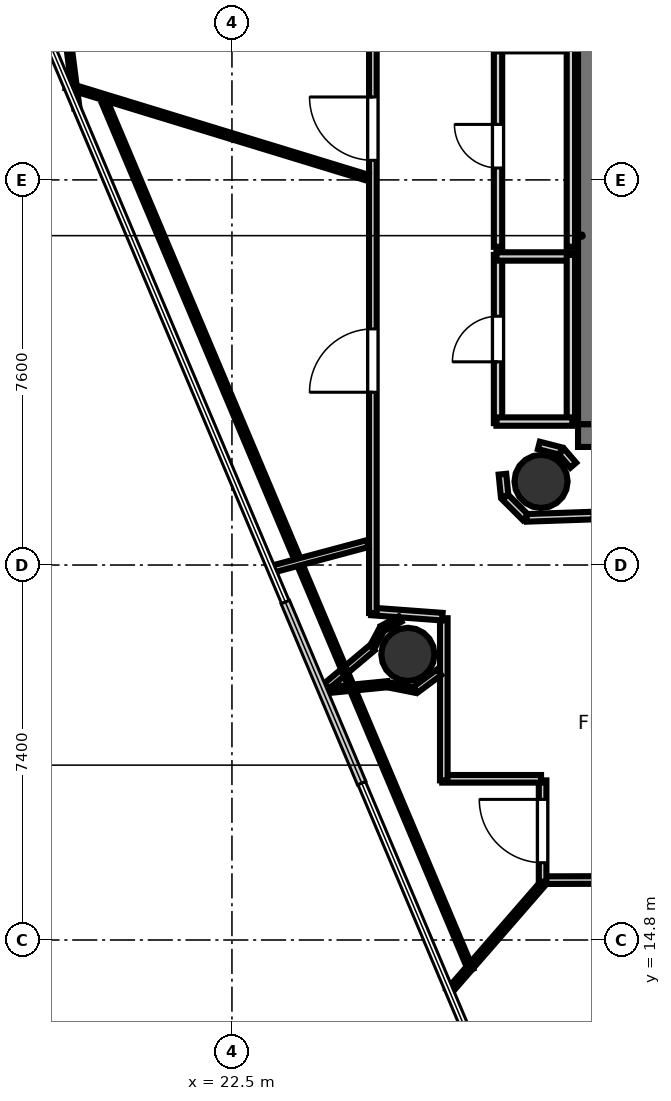
"""IFC4 building model, lengths in metres.
Left out: names, types, materials, properties, quantities, classifications, styles, units other than length and angle.
Written with IfcOpenShell. Run it as: python <this file> out.ifc"""

import sys

from ifc_helpers import new_model, si_unit, direction, frame, frame_2d, origin, origin_2d, place, context, subcontext, project, spatial, rectangle, hollow_circle, extrude, element, fill, save


model = new_model("IFC4")
c1 = context("Model", 3, precision=1e-05, world=origin(), true_north=direction((0.0, 1.0)))
c2 = subcontext(c1, "Body", "Model", "MODEL_VIEW")
j1 = project(units=[si_unit("LENGTHUNIT", "METRE"), si_unit("PLANEANGLEUNIT", "RADIAN")], contexts=[c1])
p1 = place(None, origin())
s1 = spatial("IfcSite", under=j1, at=p1, CompositionType="ELEMENT")
p2 = place(p1, origin())
s2 = spatial("IfcBuilding", under=s1, at=p2, CompositionType="ELEMENT")
p3 = place(p2, frame((0.0, 0.0, 246.4)))
s3 = spatial("IfcBuildingStorey", under=s2, at=p3, CompositionType="ELEMENT", Elevation=246.4)
p4 = place(p3, frame((29.33, 24.755, 0.0), z_axis=(0.0, 0.0, 1.0), x_axis=(1.0, 0.0, 0.0)))
e1 = element("IfcWall", 1, at=p4, inside=s3, PredefinedType="SHEAR", context=c2, shape_type="SweptSolid", body=[
    extrude(rectangle(XDim=10.52, YDim=0.45, at=frame_2d((5.26, 0.0))), origin(), (0.0, 0.0, 1.0), 3.52),
])
p5 = place(p4, frame((0.695, 0.0, 0.0)))
e2 = element("IfcOpeningElement", 2, at=p5, cuts=e1, PredefinedType="OPENING", context=c2, shape_type="SweptSolid", body=[
    extrude(rectangle(XDim=1.25, YDim=2.15, at=frame_2d((0.625, 1.075))), frame((0.0, 0.235, 0.0), z_axis=(0.0, -1.0, 0.0), x_axis=(1.0, 0.0, 0.0)), (0.0, 0.0, 1.0), 0.47),
])
p6 = place(p3, frame((29.555, 24.98, 0.0), z_axis=(0.0, 0.0, 1.0), x_axis=(0.0, 1.0, 0.0)))
e3 = element("IfcWall", 3, at=p6, inside=s3, PredefinedType="SHEAR", context=c2, shape_type="SweptSolid", body=[
    extrude(rectangle(XDim=7.44, YDim=0.45, at=frame_2d((3.72, 0.0))), origin(), (0.0, 0.0, 1.0), 3.52),
])
for number, where, z_axis, x_axis in (
    (4, (28.6, 23.85, 0.0), (0.0, 0.0, 1.0), (1.0, 0.0, 0.0)),
    (5, (25.972, 20.437, 0.0), (0.0, 0.0, 1.0), (1.0, 0.0, 0.0)),
):
    element("IfcColumn", number, at=place(p3, frame(where, z_axis=z_axis, x_axis=x_axis)), inside=s3, PredefinedType="COLUMN", context=c2, shape_type="SweptSolid", body=[
        extrude(hollow_circle(Radius=0.525, WallThickness=0.028, at=origin_2d()), origin(), (0.0, 0.0, 1.0), 3.7),
    ])
p7 = place(p3, frame((27.751, 25.0, 0.0), z_axis=(0.0, 0.0, 1.0), x_axis=(0.0, 1.0, 0.0)))
e6 = element("IfcWall", 6, at=p7, inside=s3, PredefinedType="PLUMBINGWALL", context=c2, shape_type="SweptSolid", body=[
    extrude(rectangle(XDim=3.32, YDim=0.165, at=frame_2d((1.66, 0.0))), origin(), (0.0, 0.0, 1.0), 2.84),
])
p8 = place(p7, frame((1.21, 0.0, 0.0)))
e7 = element("IfcOpeningElement", 7, at=p8, cuts=e6, PredefinedType="OPENING", context=c2, shape_type="SweptSolid", body=[
    extrude(rectangle(XDim=0.9, YDim=2.1, at=frame_2d((0.45, 1.05))), frame((0.0, 0.093, 0.0), z_axis=(0.0, -1.0, 0.0), x_axis=(1.0, 0.0, 0.0)), (0.0, 0.0, 1.0), 0.185),
])
p9 = place(p3, frame((27.72, 28.289, 0.0), z_axis=(0.0, 0.0, 1.0), x_axis=(1.0, 0.0, 0.0)))
e8 = element("IfcWall", 8, at=p9, inside=s3, PredefinedType="PLUMBINGWALL", context=c2, shape_type="SweptSolid", body=[
    extrude(rectangle(XDim=1.5, YDim=0.165, at=frame_2d((0.75, 0.0))), origin(), (0.0, 0.0, 1.0), 2.84),
])
p10 = place(p3, frame((29.189, 28.32, 0.0), z_axis=(0.0, 0.0, 1.0), x_axis=(0.0, -1.0, 0.0)))
e9 = element("IfcWall", 9, at=p10, inside=s3, PredefinedType="PLUMBINGWALL", context=c2, shape_type="SweptSolid", body=[
    extrude(rectangle(XDim=3.32, YDim=0.165, at=frame_2d((1.66, 0.0))), origin(), (0.0, 0.0, 1.0), 2.84),
])
p11 = place(p3, frame((29.22, 25.031, 0.0), z_axis=(0.0, 0.0, 1.0), x_axis=(-1.0, 0.0, 0.0)))
e10 = element("IfcWall", 10, at=p11, inside=s3, PredefinedType="PLUMBINGWALL", context=c2, shape_type="SweptSolid", body=[
    extrude(rectangle(XDim=1.5, YDim=0.165, at=frame_2d((0.75, 0.0))), origin(), (0.0, 0.0, 1.0), 2.84),
])
p12 = place(p3, frame((27.751, 28.48, 0.0), z_axis=(0.0, 0.0, 1.0), x_axis=(0.0, 1.0, 0.0)))
e11 = element("IfcWall", 11, at=p12, inside=s3, PredefinedType="PLUMBINGWALL", context=c2, shape_type="SweptSolid", body=[
    extrude(rectangle(XDim=3.97, YDim=0.165, at=frame_2d((1.985, 0.0))), origin(), (0.0, 0.0, 1.0), 2.84),
])
p13 = place(p12, frame((1.555, 0.0, 0.0)))
e12 = element("IfcOpeningElement", 12, at=p13, cuts=e11, PredefinedType="OPENING", context=c2, shape_type="SweptSolid", body=[
    extrude(rectangle(XDim=0.86, YDim=2.05, at=frame_2d((0.43, 1.025))), frame((0.0, 0.093, 0.0), z_axis=(0.0, -1.0, 0.0), x_axis=(1.0, 0.0, 0.0)), (0.0, 0.0, 1.0), 0.185),
])
p14 = place(p3, frame((29.189, 32.45, 0.0), z_axis=(0.0, 0.0, 1.0), x_axis=(0.0, -1.0, 0.0)))
e13 = element("IfcWall", 13, at=p14, inside=s3, PredefinedType="PLUMBINGWALL", context=c2, shape_type="SweptSolid", body=[
    extrude(rectangle(XDim=3.97, YDim=0.165, at=frame_2d((1.985, 0.0))), origin(), (0.0, 0.0, 1.0), 2.84),
])
p15 = place(p3, frame((29.236, 24.17, 0.0), z_axis=(0.0, 0.0, 1.0), x_axis=(-0.652260263346, 0.757995084984, 0.0)))
e14 = element("IfcWall", 14, at=p15, inside=s3, PredefinedType="PARTITIONING", context=c2, shape_type="SweptSolid", body=[
    extrude(rectangle(XDim=0.355, YDim=0.15, at=frame_2d((0.178, 0.0))), origin(), (0.0, 0.0, 1.0), 2.84),
])
p16 = place(p3, frame((28.988, 24.45, 0.0), z_axis=(0.0, 0.0, 1.0), x_axis=(-0.968704505916, 0.248216800836, 0.0)))
e15 = element("IfcWall", 15, at=p16, inside=s3, PredefinedType="PARTITIONING", context=c2, shape_type="SweptSolid", body=[
    extrude(rectangle(XDim=0.445, YDim=0.15, at=frame_2d((0.222, 0.0))), origin(), (0.0, 0.0, 1.0), 2.84),
])
p17 = place(p3, frame((27.838, 23.992, 0.0), z_axis=(0.0, 0.0, 1.0), x_axis=(0.098273407977, -0.995159453196, 0.0)))
e16 = element("IfcWall", 16, at=p17, inside=s3, PredefinedType="PARTITIONING", context=c2, shape_type="SweptSolid", body=[
    extrude(rectangle(XDim=0.432, YDim=0.15, at=frame_2d((0.216, 0.0))), origin(), (0.0, 0.0, 1.0), 2.84),
])
p18 = place(p3, frame((27.89, 23.543, 0.0), z_axis=(0.0, 0.0, 1.0), x_axis=(0.707106781187, -0.707106781187, 0.0)))
e17 = element("IfcWall", 17, at=p18, inside=s3, PredefinedType="PARTITIONING", context=c2, shape_type="SweptSolid", body=[
    extrude(rectangle(XDim=0.57, YDim=0.15, at=frame_2d((0.285, 0.0))), origin(), (0.0, 0.0, 1.0), 2.84),
])
p19 = place(p3, frame((28.316, 23.131, 0.0), z_axis=(0.0, 0.0, 1.0), x_axis=(0.999405342193, 0.034481328227, 0.0)))
e18 = element("IfcWall", 18, at=p19, inside=s3, PredefinedType="PARTITIONING", context=c2, shape_type="SweptSolid", body=[
    extrude(rectangle(XDim=1.324, YDim=0.15, at=frame_2d((0.662, 0.0))), origin(), (0.0, 0.0, 1.0), 2.84),
])
p20 = place(p3, frame((43.709, 16.02, 0.0), z_axis=(0.0, 0.0, 1.0), x_axis=(-0.999996657873, -0.002585390319, 0.0)))
e19 = element("IfcWall", 19, at=p20, inside=s3, PredefinedType="PARTITIONING", context=c2, shape_type="SweptSolid", body=[
    extrude(rectangle(XDim=15.109, YDim=0.15, at=frame_2d((7.554, 0.0))), origin(), (0.0, 0.0, 1.0), 2.84),
])
p21 = place(p20, frame((10.129, 0.0, 0.0)))
e20 = element("IfcOpeningElement", 20, at=p21, cuts=e19, PredefinedType="OPENING", context=c2, shape_type="SweptSolid", body=[
    extrude(rectangle(XDim=1.25, YDim=2.2, at=frame_2d((0.625, 1.1))), frame((0.0, 0.085, 0.0), z_axis=(0.0, -1.0, 0.0), x_axis=(1.0, 0.0, 0.0)), (0.0, 0.0, 1.0), 0.17),
])
p22 = place(p20, frame((3.337, 0.0, 0.0)))
e21 = element("IfcOpeningElement", 21, at=p22, cuts=e19, PredefinedType="OPENING", context=c2, shape_type="SweptSolid", body=[
    extrude(rectangle(XDim=1.25, YDim=2.2, at=frame_2d((0.625, 1.1))), frame((0.0, 0.085, 0.0), z_axis=(0.0, -1.0, 0.0), x_axis=(1.0, 0.0, 0.0)), (0.0, 0.0, 1.0), 0.17),
])
p23 = place(p3, frame((28.631, 15.95, 0.0), z_axis=(0.0, 0.0, 1.0), x_axis=(0.0, 1.0, 0.0)))
e22 = element("IfcWall", 22, at=p23, inside=s3, PredefinedType="PARTITIONING", context=c2, shape_type="SweptSolid", body=[
    extrude(rectangle(XDim=2.0, YDim=0.15, at=frame_2d((1.0, 0.0))), origin(), (0.0, 0.0, 1.0), 2.84),
])
p24 = place(p23, frame((0.375, 0.0, 0.0)))
e23 = element("IfcOpeningElement", 23, at=p24, cuts=e22, PredefinedType="OPENING", context=c2, shape_type="SweptSolid", body=[
    extrude(rectangle(XDim=1.25, YDim=2.2, at=frame_2d((0.625, 1.1))), frame((0.0, 0.085, 0.0), z_axis=(0.0, -1.0, 0.0), x_axis=(1.0, 0.0, 0.0)), (0.0, 0.0, 1.0), 0.17),
])
p25 = place(p3, frame((28.6, 17.981, 0.0), z_axis=(0.0, 0.0, 1.0), x_axis=(-1.0, 0.0, 0.0)))
e24 = element("IfcWall", 24, at=p25, inside=s3, PredefinedType="PARTITIONING", context=c2, shape_type="SweptSolid", body=[
    extrude(rectangle(XDim=1.95, YDim=0.15, at=frame_2d((0.975, 0.0))), origin(), (0.0, 0.0, 1.0), 2.84),
])
p26 = place(p3, frame((26.681, 17.95, 0.0), z_axis=(0.0, 0.0, 1.0), x_axis=(0.0, 1.0, 0.0)))
e25 = element("IfcWall", 25, at=p26, inside=s3, PredefinedType="PARTITIONING", context=c2, shape_type="SweptSolid", body=[
    extrude(rectangle(XDim=3.2, YDim=0.15, at=frame_2d((1.6, 0.0))), origin(), (0.0, 0.0, 1.0), 2.84),
])
p27 = place(p3, frame((26.652, 21.181, 0.0), z_axis=(0.0, 0.0, 1.0), x_axis=(-0.997303696291, 0.073384857861, 0.0)))
e26 = element("IfcWall", 26, at=p27, inside=s3, PredefinedType="PARTITIONING", context=c2, shape_type="SweptSolid", body=[
    extrude(rectangle(XDim=1.404, YDim=0.15, at=frame_2d((0.702, 0.0))), origin(), (0.0, 0.0, 1.0), 2.84),
])
p28 = place(p3, frame((25.281, 21.253, 0.0), z_axis=(0.0, 0.0, 1.0), x_axis=(0.0, 1.0, 0.0)))
e27 = element("IfcWall", 27, at=p28, inside=s3, PredefinedType="PARTITIONING", context=c2, shape_type="SweptSolid", body=[
    extrude(rectangle(XDim=11.297, YDim=0.15, at=frame_2d((5.648, 0.0))), origin(), (0.0, 0.0, 1.0), 2.84),
])
p29 = place(p28, frame((8.933, 0.0, 0.0)))
e28 = element("IfcOpeningElement", 28, at=p29, cuts=e27, PredefinedType="OPENING", context=c2, shape_type="SweptSolid", body=[
    extrude(rectangle(XDim=1.25, YDim=2.2, at=frame_2d((0.625, 1.1))), frame((0.0, 0.085, 0.0), z_axis=(0.0, -1.0, 0.0), x_axis=(1.0, 0.0, 0.0)), (0.0, 0.0, 1.0), 0.17),
])
p30 = place(p28, frame((4.356, 0.0, 0.0)))
e29 = element("IfcOpeningElement", 29, at=p30, cuts=e27, PredefinedType="OPENING", context=c2, shape_type="SweptSolid", body=[
    extrude(rectangle(XDim=1.25, YDim=2.2, at=frame_2d((0.625, 1.1))), frame((0.0, 0.085, 0.0), z_axis=(0.0, -1.0, 0.0), x_axis=(1.0, 0.0, 0.0)), (0.0, 0.0, 1.0), 0.17),
])
p31 = place(p3, frame((25.819, 21.135, 0.0), z_axis=(0.0, 0.0, 1.0), x_axis=(-0.880749970322, -0.473581555571, 0.0)))
e30 = element("IfcWall", 30, at=p31, inside=s3, PredefinedType="PARTITIONING", context=c2, shape_type="SweptSolid", body=[
    extrude(rectangle(XDim=0.393, YDim=0.12, at=frame_2d((0.197, 0.0))), origin(), (0.0, 0.0, 1.0), 2.84),
])
p32 = place(p3, frame((25.46, 20.936, 0.0), z_axis=(0.0, 0.0, 1.0), x_axis=(-0.471352579484, -0.881944865518, 0.0)))
e31 = element("IfcWall", 31, at=p32, inside=s3, PredefinedType="PARTITIONING", context=c2, shape_type="SweptSolid", body=[
    extrude(rectangle(XDim=0.398, YDim=0.105, at=frame_2d((0.199, 0.0))), origin(), (0.0, 0.0, 1.0), 2.84),
])
p33 = place(p3, frame((25.269, 20.568, 0.0), z_axis=(0.0, 0.0, 1.0), x_axis=(-0.765667528087, -0.643236532259, 0.0)))
e32 = element("IfcWall", 32, at=p33, inside=s3, PredefinedType="PARTITIONING", context=c2, shape_type="SweptSolid", body=[
    extrude(rectangle(XDim=1.288, YDim=0.14, at=frame_2d((0.644, 0.0))), origin(), (0.0, 0.0, 1.0), 2.84),
])
p34 = place(p3, frame((24.29, 19.722, 0.0), z_axis=(0.0, 0.0, 1.0), x_axis=(0.995210765311, 0.097752404619, 0.0)))
e33 = element("IfcWall", 33, at=p34, inside=s3, PredefinedType="PARTITIONING", context=c2, shape_type="SweptSolid", body=[
    extrude(rectangle(XDim=1.284, YDim=0.12, at=frame_2d((0.642, 0.0))), origin(), (0.0, 0.0, 1.0), 2.84),
])
p35 = place(p3, frame((25.585, 19.837, 0.0), z_axis=(0.0, 0.0, 1.0), x_axis=(0.98086624294, -0.194682853537, 0.0)))
e34 = element("IfcWall", 34, at=p35, inside=s3, PredefinedType="PARTITIONING", context=c2, shape_type="SweptSolid", body=[
    extrude(rectangle(XDim=0.524, YDim=0.105, at=frame_2d((0.262, 0.0))), origin(), (0.0, 0.0, 1.0), 2.84),
])
p36 = place(p3, frame((26.124, 19.74, 0.0), z_axis=(0.0, 0.0, 1.0), x_axis=(0.803130617249, 0.595802997339, 0.0)))
e35 = element("IfcWall", 35, at=p36, inside=s3, PredefinedType="PARTITIONING", context=c2, shape_type="SweptSolid", body=[
    extrude(rectangle(XDim=0.578, YDim=0.14, at=frame_2d((0.289, 0.0))), origin(), (0.0, 0.0, 1.0), 2.84),
])
p37 = place(p3, frame((28.615, 15.89, 0.0), z_axis=(0.0, 0.0, 1.0), x_axis=(-0.656005918299, -0.754755745362, 0.0)))
e36 = element("IfcWall", 36, at=p37, inside=s3, PredefinedType="PARTITIONING", context=c2, shape_type="SweptSolid", body=[
    extrude(rectangle(XDim=2.799, YDim=0.12, at=frame_2d((1.399, 0.0))), origin(), (0.0, 0.0, 1.0), 2.84),
])
p38 = place(p3, frame((27.214, 14.211, 0.0), z_axis=(0.0, 0.0, 1.0), x_axis=(-0.388823456639, 0.921312281242, 0.0)))
e37 = element("IfcWall", 37, at=p38, inside=s3, PredefinedType="PARTITIONING", context=c2, shape_type="SweptSolid", body=[
    extrude(rectangle(XDim=8.771, YDim=0.105, at=frame_2d((4.385, 0.0))), origin(), (0.0, 0.0, 1.0), 2.84),
])
p39 = place(p3, frame((23.261, 22.109, 0.0), z_axis=(0.0, 0.0, 1.0), x_axis=(0.965915648111, 0.258857027592, 0.0)))
e38 = element("IfcWall", 38, at=p39, inside=s3, PredefinedType="PARTITIONING", context=c2, shape_type="SweptSolid", body=[
    extrude(rectangle(XDim=1.984, YDim=0.14, at=frame_2d((0.992, 0.0))), origin(), (0.0, 0.0, 1.0), 2.84),
])
p40 = place(p3, frame((25.179, 29.843, 0.0), z_axis=(0.0, 0.0, 1.0), x_axis=(-0.956308261193, 0.292360239385, 0.0)))
e39 = element("IfcWall", 39, at=p40, inside=s3, PredefinedType="PARTITIONING", context=c2, shape_type="SweptSolid", body=[
    extrude(rectangle(XDim=6.215, YDim=0.12, at=frame_2d((3.108, 0.0))), origin(), (0.0, 0.0, 1.0), 2.84),
])
p41 = place(p3, frame((19.439, 31.217, 0.0), z_axis=(0.0, 0.0, 1.0), x_axis=(-0.126993176295, 0.991903590665, 0.0)))
e40 = element("IfcWall", 40, at=p41, inside=s3, PredefinedType="PARTITIONING", context=c2, shape_type="SweptSolid", body=[
    extrude(rectangle(XDim=2.051, YDim=0.105, at=frame_2d((1.026, 0.0))), origin(), (0.0, 0.0, 1.0), 2.84),
])
p42 = place(p3, frame((23.771, 22.369, 0.0), z_axis=(0.0, 0.0, 1.0), x_axis=(-0.388787402113, 0.921327496582, 0.0)))
e41 = element("IfcWall", 41, at=p42, inside=s3, PredefinedType="PARTITIONING", context=c2, shape_type="SweptSolid", body=[
    extrude(rectangle(XDim=9.726, YDim=0.12, at=frame_2d((4.863, 0.0))), origin(), (0.0, 0.0, 1.0), 2.84),
])
p43 = place(p8, origin())
e42 = element("IfcDoor", 42, at=p43, inside=s3, OperationType="SINGLE_SWING_LEFT", PredefinedType="DOOR", context=c2, shape_type="SweptSolid", body=[
    extrude(rectangle(XDim=0.9, YDim=2.1, at=frame_2d((0.45, 1.05))), frame((0.0, 0.025, 0.0), z_axis=(0.0, -1.0, 0.0), x_axis=(1.0, 0.0, 0.0)), (0.0, 0.0, 1.0), 0.05),
])
fill(e7, e42)
p44 = place(p13, origin())
e43 = element("IfcDoor", 43, at=p44, inside=s3, OperationType="SINGLE_SWING_RIGHT", PredefinedType="DOOR", context=c2, shape_type="SweptSolid", body=[
    extrude(rectangle(XDim=0.86, YDim=2.05, at=frame_2d((0.43, 1.025))), frame((0.0, 0.025, 0.0), z_axis=(0.0, -1.0, 0.0), x_axis=(1.0, 0.0, 0.0)), (0.0, 0.0, 1.0), 0.05),
])
fill(e12, e43)
p45 = place(p24, origin())
e44 = element("IfcDoor", 44, at=p45, inside=s3, OperationType="SINGLE_SWING_RIGHT", PredefinedType="DOOR", context=c2, shape_type="SweptSolid", body=[
    extrude(rectangle(XDim=1.25, YDim=2.2, at=frame_2d((0.625, 1.1))), frame((0.0, 0.025, 0.0), z_axis=(0.0, -1.0, 0.0), x_axis=(1.0, 0.0, 0.0)), (0.0, 0.0, 1.0), 0.05),
])
fill(e23, e44)
p46 = place(p29, origin())
e45 = element("IfcDoor", 45, at=p46, inside=s3, OperationType="SINGLE_SWING_RIGHT", PredefinedType="DOOR", context=c2, shape_type="SweptSolid", body=[
    extrude(rectangle(XDim=1.25, YDim=2.2, at=frame_2d((0.625, 1.1))), frame((0.0, 0.025, 0.0), z_axis=(0.0, -1.0, 0.0), x_axis=(1.0, 0.0, 0.0)), (0.0, 0.0, 1.0), 0.05),
])
fill(e28, e45)
p47 = place(p30, origin())
e46 = element("IfcDoor", 46, at=p47, inside=s3, OperationType="SINGLE_SWING_LEFT", PredefinedType="DOOR", context=c2, shape_type="SweptSolid", body=[
    extrude(rectangle(XDim=1.25, YDim=2.2, at=frame_2d((0.625, 1.1))), frame((0.0, 0.025, 0.0), z_axis=(0.0, -1.0, 0.0), x_axis=(1.0, 0.0, 0.0)), (0.0, 0.0, 1.0), 0.05),
])
fill(e29, e46)
save(model, sys.argv[1])
